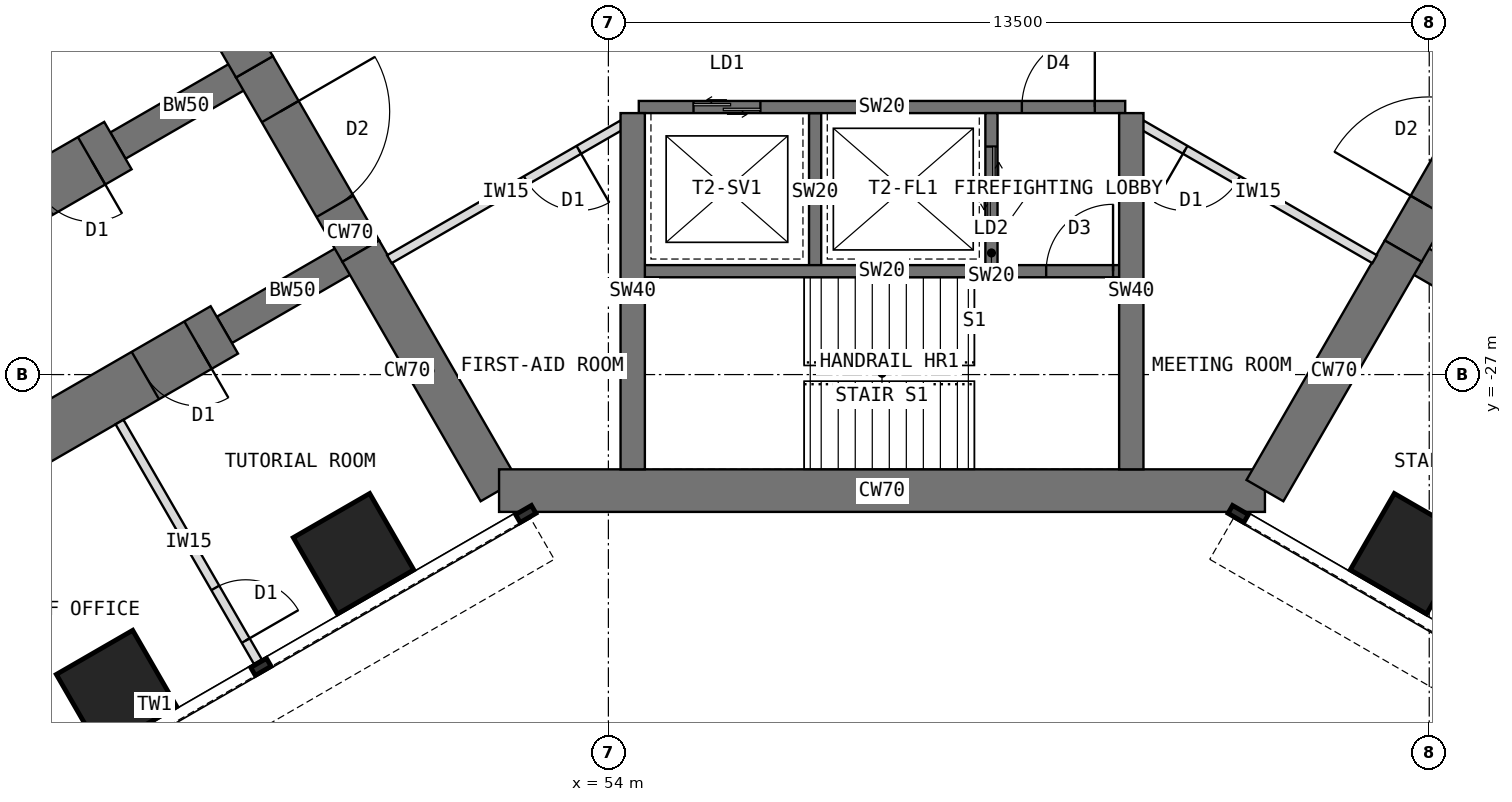
"""IFC4 building model, lengths in metres.
Left out: names, types, materials, properties, quantities, classifications, styles, units other than length and angle.
Written with IfcOpenShell. Run it as: python <this file> out.ifc"""

import sys

from ifc_helpers import new_model, si_unit, direction, frame, frame_2d, origin, origin_2d, place, context, subcontext, project, spatial, rectangle, extrude, element, fill, save


model = new_model("IFC4")
c1 = context("Model", 3, precision=1e-05, world=origin(), true_north=direction((0.0, 1.0)))
c2 = subcontext(c1, "Body", "Model", "MODEL_VIEW")
j1 = project(units=[si_unit("LENGTHUNIT", "METRE"), si_unit("PLANEANGLEUNIT", "RADIAN")], contexts=[c1])
p1 = place(None, origin())
s1 = spatial("IfcSite", under=j1, at=p1, CompositionType="ELEMENT")
p2 = place(p1, origin())
s2 = spatial("IfcBuilding", under=s1, at=p2, CompositionType="ELEMENT")
p3 = place(p2, frame((0.0, 0.0, 68.5)))
s3 = spatial("IfcBuildingStorey", under=s2, at=p3, CompositionType="ELEMENT", Elevation=68.5)
p4 = place(p3, frame((45.904, -18.0, 0.0), z_axis=(0.0, 0.0, 1.0), x_axis=(0.500024481964, -0.866011268655, 0.0)))
e1 = element("IfcWall", 1, at=p4, inside=s3, PredefinedType="SHEAR", context=c2, shape_type="SweptSolid", body=[
    extrude(rectangle(XDim=4.548, YDim=0.7, at=frame_2d((2.274, 0.0))), origin(), (0.0, 0.0, 1.0), 4.0),
])
p5 = place(p3, frame((48.178, -21.939, 0.0), z_axis=(0.0, 0.0, 1.0), x_axis=(0.500010275428, -0.866019471182, 0.0)))
e2 = element("IfcWall", 2, at=p5, inside=s3, PredefinedType="SHEAR", context=c2, shape_type="SweptSolid", body=[
    extrude(rectangle(XDim=3.5, YDim=0.7, at=frame_2d((1.75, 0.0))), origin(), (0.0, 0.0, 1.0), 4.0),
])
p6 = place(p5, frame((0.85, 0.0, 0.0)))
e3 = element("IfcOpeningElement", 3, at=p6, cuts=e2, PredefinedType="OPENING", context=c2, shape_type="SweptSolid", body=[
    extrude(rectangle(XDim=1.8, YDim=2.1, at=frame_2d((0.9, 1.05))), frame((0.0, 0.36, 0.0), z_axis=(0.0, -1.0, 0.0), x_axis=(1.0, 0.0, 0.0)), (0.0, 0.0, 1.0), 0.72),
])
p7 = place(p3, frame((49.928, -24.97, 0.0), z_axis=(0.0, 0.0, 1.0), x_axis=(0.499984222037, -0.866034513004, 0.0)))
e4 = element("IfcWall", 4, at=p7, inside=s3, PredefinedType="SHEAR", context=c2, shape_type="SweptSolid", body=[
    extrude(rectangle(XDim=4.548, YDim=0.7, at=frame_2d((2.274, 0.0))), origin(), (0.0, 0.0, 1.0), 4.0),
])
p8 = place(p3, frame((52.202, -28.908, 0.0), z_axis=(0.0, 0.0, 1.0), x_axis=(1.0, 0.0, 0.0)))
e5 = element("IfcWall", 5, at=p8, inside=s3, PredefinedType="SHEAR", context=c2, shape_type="SweptSolid", body=[
    extrude(rectangle(XDim=12.596, YDim=0.7, at=frame_2d((6.298, 0.0))), origin(), (0.0, 0.0, 1.0), 4.0),
])
p9 = place(p3, frame((64.798, -28.908, 0.0), z_axis=(0.0, 0.0, 1.0), x_axis=(0.499984222037, 0.866034513004, 0.0)))
e6 = element("IfcWall", 6, at=p9, inside=s3, PredefinedType="SHEAR", context=c2, shape_type="SweptSolid", body=[
    extrude(rectangle(XDim=4.548, YDim=0.7, at=frame_2d((2.274, 0.0))), origin(), (0.0, 0.0, 1.0), 4.0),
])
p10 = place(p3, frame((67.072, -24.97, 0.0), z_axis=(0.0, 0.0, 1.0), x_axis=(0.500010275428, 0.866019471182, 0.0)))
e7 = element("IfcWall", 7, at=p10, inside=s3, PredefinedType="SHEAR", context=c2, shape_type="SweptSolid", body=[
    extrude(rectangle(XDim=3.5, YDim=0.7, at=frame_2d((1.75, 0.0))), origin(), (0.0, 0.0, 1.0), 4.0),
])
p11 = place(p10, frame((0.85, 0.0, 0.0)))
e8 = element("IfcOpeningElement", 8, at=p11, cuts=e7, PredefinedType="OPENING", context=c2, shape_type="SweptSolid", body=[
    extrude(rectangle(XDim=1.8, YDim=2.1, at=frame_2d((0.9, 1.05))), frame((0.0, 0.36, 0.0), z_axis=(0.0, -1.0, 0.0), x_axis=(1.0, 0.0, 0.0)), (0.0, 0.0, 1.0), 0.72),
])
p12 = place(p3, frame((49.928, -24.97, 0.0), z_axis=(0.0, 0.0, 1.0), x_axis=(-0.866031863473, -0.499988811324, 0.0)))
e9 = element("IfcWall", 9, at=p12, inside=s3, PredefinedType="SHEAR", context=c2, shape_type="SweptSolid", body=[
    extrude(rectangle(XDim=2.592, YDim=0.5, at=frame_2d((1.296, 0.0))), origin(), (0.0, 0.0, 1.0), 4.0),
])
p13 = place(p3, frame((47.684, -26.266, 0.0), z_axis=(0.0, 0.0, 1.0), x_axis=(-0.866027579429, -0.499996231654, 0.0)))
e10 = element("IfcWall", 10, at=p13, inside=s3, PredefinedType="SHEAR", context=c2, shape_type="SweptSolid", body=[
    extrude(rectangle(XDim=13.2, YDim=0.9, at=frame_2d((6.6, 0.0))), origin(), (0.0, 0.0, 1.0), 4.0),
])
p14 = place(p13, frame((0.5, 0.0, 0.0)))
e11 = element("IfcOpeningElement", 11, at=p14, cuts=e10, PredefinedType="OPENING", context=c2, shape_type="SweptSolid", body=[
    extrude(rectangle(XDim=1.0, YDim=2.1, at=frame_2d((0.5, 1.05))), frame((0.0, 0.46, 0.0), z_axis=(0.0, -1.0, 0.0), x_axis=(1.0, 0.0, 0.0)), (0.0, 0.0, 1.0), 0.92),
])
p15 = place(p13, frame((7.25, 0.0, 0.0)))
e12 = element("IfcOpeningElement", 12, at=p15, cuts=e10, PredefinedType="OPENING", context=c2, shape_type="SweptSolid", body=[
    extrude(rectangle(XDim=1.0, YDim=2.1, at=frame_2d((0.5, 1.05))), frame((0.0, 0.46, 0.0), z_axis=(0.0, -1.0, 0.0), x_axis=(1.0, 0.0, 0.0)), (0.0, 0.0, 1.0), 0.92),
])
p16 = place(p3, frame((48.178, -21.939, 0.0), z_axis=(0.0, 0.0, 1.0), x_axis=(-0.866072649678, -0.499918158782, 0.0)))
e13 = element("IfcWall", 13, at=p16, inside=s3, PredefinedType="SHEAR", context=c2, shape_type="SweptSolid", body=[
    extrude(rectangle(XDim=2.592, YDim=0.5, at=frame_2d((1.296, 0.0))), origin(), (0.0, 0.0, 1.0), 4.0),
])
p17 = place(p3, frame((45.934, -23.234, 0.0), z_axis=(0.0, 0.0, 1.0), x_axis=(-0.866019570528, -0.500010103361, 0.0)))
e14 = element("IfcWall", 14, at=p17, inside=s3, PredefinedType="SHEAR", context=c2, shape_type="SweptSolid", body=[
    extrude(rectangle(XDim=13.2, YDim=0.9, at=frame_2d((6.6, 0.0))), origin(), (0.0, 0.0, 1.0), 4.0),
])
p18 = place(p17, frame((0.5, 0.0, 0.0)))
e15 = element("IfcOpeningElement", 15, at=p18, cuts=e14, PredefinedType="OPENING", context=c2, shape_type="SweptSolid", body=[
    extrude(rectangle(XDim=1.0, YDim=2.1, at=frame_2d((0.5, 1.05))), frame((0.0, 0.46, 0.0), z_axis=(0.0, -1.0, 0.0), x_axis=(1.0, 0.0, 0.0)), (0.0, 0.0, 1.0), 0.92),
])
p19 = place(p17, frame((7.25, 0.0, 0.0)))
e16 = element("IfcOpeningElement", 16, at=p19, cuts=e14, PredefinedType="OPENING", context=c2, shape_type="SweptSolid", body=[
    extrude(rectangle(XDim=1.0, YDim=2.1, at=frame_2d((0.5, 1.05))), frame((0.0, 0.46, 0.0), z_axis=(0.0, -1.0, 0.0), x_axis=(1.0, 0.0, 0.0)), (0.0, 0.0, 1.0), 0.92),
])
p20 = place(p3, frame((67.072, -24.97, 0.0), z_axis=(0.0, 0.0, 1.0), x_axis=(0.866031863473, -0.499988811324, 0.0)))
e17 = element("IfcWall", 17, at=p20, inside=s3, PredefinedType="SHEAR", context=c2, shape_type="SweptSolid", body=[
    extrude(rectangle(XDim=2.592, YDim=0.5, at=frame_2d((1.296, 0.0))), origin(), (0.0, 0.0, 1.0), 4.0),
])
for number, where, z_axis, x_axis in (
    (18, (49.809, -29.946, 0.0), (0.0, 0.0, 1.0), (0.866, 0.5, 0.0)),
    (19, (45.912, -32.196, 0.0), (0.0, 0.0, 1.0), (0.866, 0.5, 0.0)),
    (20, (67.191, -29.946, 0.0), (0.0, 0.0, 1.0), (0.5, 0.866, 0.0)),
):
    element("IfcColumn", number, at=place(p3, frame(where, z_axis=z_axis, x_axis=x_axis)), inside=s3, PredefinedType="COLUMN", context=c2, shape_type="SweptSolid", body=[
        extrude(rectangle(XDim=1.45, YDim=1.45, at=origin_2d()), origin(), (0.0, 0.0, 1.0), 4.0),
    ])
p21 = place(p3, frame((54.5, -22.6, 0.0), z_axis=(0.0, 0.0, 1.0), x_axis=(1.0, 0.0, 0.0)))
e21 = element("IfcWall", 21, at=p21, inside=s3, PredefinedType="SHEAR", context=c2, shape_type="SweptSolid", body=[
    extrude(rectangle(XDim=8.0, YDim=0.2, at=frame_2d((4.0, 0.0))), origin(), (0.0, 0.0, 1.0), 4.0),
])
p22 = place(p21, frame((6.3, 0.0, 0.0)))
e22 = element("IfcOpeningElement", 22, at=p22, cuts=e21, PredefinedType="OPENING", context=c2, shape_type="SweptSolid", body=[
    extrude(rectangle(XDim=1.2, YDim=2.1, at=frame_2d((0.6, 1.05))), frame((0.0, 0.11, 0.0), z_axis=(0.0, -1.0, 0.0), x_axis=(1.0, 0.0, 0.0)), (0.0, 0.0, 1.0), 0.22),
])
p23 = place(p21, frame((0.9, 0.0, 0.0)))
e23 = element("IfcOpeningElement", 23, at=p23, cuts=e21, PredefinedType="OPENING", context=c2, shape_type="SweptSolid", body=[
    extrude(rectangle(XDim=1.1, YDim=2.2, at=frame_2d((0.55, 1.1))), frame((0.0, 0.11, 0.0), z_axis=(0.0, -1.0, 0.0), x_axis=(1.0, 0.0, 0.0)), (0.0, 0.0, 1.0), 0.22),
])
p24 = place(p3, frame((57.4, -22.7, 0.0), z_axis=(0.0, 0.0, 1.0), x_axis=(0.0, -1.0, 0.0)))
e24 = element("IfcWall", 24, at=p24, inside=s3, PredefinedType="SHEAR", context=c2, shape_type="SweptSolid", body=[
    extrude(rectangle(XDim=2.6, YDim=0.2, at=frame_2d((1.3, 0.0))), origin(), (0.0, 0.0, 1.0), 4.0),
])
p25 = place(p3, frame((60.3, -22.7, 0.0), z_axis=(0.0, 0.0, 1.0), x_axis=(0.0, -1.0, 0.0)))
e25 = element("IfcWall", 25, at=p25, inside=s3, PredefinedType="SHEAR", context=c2, shape_type="SweptSolid", body=[
    extrude(rectangle(XDim=2.6, YDim=0.2, at=frame_2d((1.3, 0.0))), origin(), (0.0, 0.0, 1.0), 4.0),
])
p26 = place(p25, frame((0.55, 0.0, 0.0)))
e26 = element("IfcOpeningElement", 26, at=p26, cuts=e25, PredefinedType="OPENING", context=c2, shape_type="SweptSolid", body=[
    extrude(rectangle(XDim=1.3, YDim=2.2, at=frame_2d((0.65, 1.1))), frame((0.0, 0.11, 0.0), z_axis=(0.0, -1.0, 0.0), x_axis=(1.0, 0.0, 0.0)), (0.0, 0.0, 1.0), 0.22),
])
p27 = place(p3, frame((54.5, -25.3, 0.0), z_axis=(0.0, 0.0, 1.0), x_axis=(1.0, 0.0, 0.0)))
e27 = element("IfcWall", 27, at=p27, inside=s3, PredefinedType="SHEAR", context=c2, shape_type="SweptSolid", body=[
    extrude(rectangle(XDim=8.0, YDim=0.2, at=frame_2d((4.0, 0.0))), origin(), (0.0, 0.0, 1.0), 4.0),
])
p28 = place(p27, frame((6.7, 0.0, 0.0)))
e28 = element("IfcOpeningElement", 28, at=p28, cuts=e27, PredefinedType="OPENING", context=c2, shape_type="SweptSolid", body=[
    extrude(rectangle(XDim=1.1, YDim=2.1, at=frame_2d((0.55, 1.05))), frame((0.0, 0.11, 0.0), z_axis=(0.0, -1.0, 0.0), x_axis=(1.0, 0.0, 0.0)), (0.0, 0.0, 1.0), 0.22),
])
for number, where, z_axis, x_axis in (
    (29, (62.6, -22.7, 0.0), (0.0, 0.0, 1.0), (0.0, -1.0, 0.0)),
    (30, (54.4, -22.7, 0.0), (0.0, 0.0, 1.0), (0.0, -1.0, 0.0)),
):
    element("IfcWall", number, at=place(p3, frame(where, z_axis=z_axis, x_axis=x_axis)), inside=s3, PredefinedType="SHEAR", context=c2, shape_type="SweptSolid", body=[
        extrude(rectangle(XDim=5.858, YDim=0.4, at=frame_2d((2.929, 0.0))), origin(), (0.0, 0.0, 1.0), 4.0),
    ])
p29 = place(p3, frame((45.96, -27.78, 0.0), z_axis=(0.0, 0.0, 1.0), x_axis=(0.499982560684, -0.866035472144, 0.0)))
e31 = element("IfcWall", 31, at=p29, inside=s3, PredefinedType="PARTITIONING", context=c2, shape_type="SweptSolid", body=[
    extrude(rectangle(XDim=4.55, YDim=0.15, at=frame_2d((2.275, 0.0))), origin(), (0.0, 0.0, 1.0), 3.8),
])
p30 = place(p29, frame((3.15, 0.0, 0.0)))
e32 = element("IfcOpeningElement", 32, at=p30, cuts=e31, PredefinedType="OPENING", context=c2, shape_type="SweptSolid", body=[
    extrude(rectangle(XDim=1.0, YDim=2.1, at=frame_2d((0.5, 1.05))), frame((0.0, 0.085, 0.0), z_axis=(0.0, -1.0, 0.0), x_axis=(1.0, 0.0, 0.0)), (0.0, 0.0, 1.0), 0.17),
])
p31 = place(p3, frame((66.603, -25.103, 0.0), z_axis=(0.0, 0.0, 1.0), x_axis=(-0.866021148949, 0.500007369519, 0.0)))
e33 = element("IfcWall", 33, at=p31, inside=s3, PredefinedType="PARTITIONING", context=c2, shape_type="SweptSolid", body=[
    extrude(rectangle(XDim=4.426, YDim=0.15, at=frame_2d((2.213, 0.0))), origin(), (0.0, 0.0, 1.0), 3.8),
])
p32 = place(p31, frame((2.598, 0.0, 0.0)))
e34 = element("IfcOpeningElement", 34, at=p32, cuts=e33, PredefinedType="OPENING", context=c2, shape_type="SweptSolid", body=[
    extrude(rectangle(XDim=1.0, YDim=2.1, at=frame_2d((0.5, 1.05))), frame((0.0, 0.085, 0.0), z_axis=(0.0, -1.0, 0.0), x_axis=(1.0, 0.0, 0.0)), (0.0, 0.0, 1.0), 0.17),
])
p33 = place(p3, frame((54.23, -22.89, 0.0), z_axis=(0.0, 0.0, 1.0), x_axis=(-0.866021148949, -0.500007369519, 0.0)))
e35 = element("IfcWall", 35, at=p33, inside=s3, PredefinedType="PARTITIONING", context=c2, shape_type="SweptSolid", body=[
    extrude(rectangle(XDim=4.426, YDim=0.15, at=frame_2d((2.213, 0.0))), origin(), (0.0, 0.0, 1.0), 3.8),
])
p34 = place(p33, frame((0.828, 0.0, 0.0)))
e36 = element("IfcOpeningElement", 36, at=p34, cuts=e35, PredefinedType="OPENING", context=c2, shape_type="SweptSolid", body=[
    extrude(rectangle(XDim=1.0, YDim=2.1, at=frame_2d((0.5, 1.05))), frame((0.0, 0.085, 0.0), z_axis=(0.0, -1.0, 0.0), x_axis=(1.0, 0.0, 0.0)), (0.0, 0.0, 1.0), 0.17),
])
p35 = place(p22, origin())
e37 = element("IfcDoor", 37, at=p35, inside=s3, OperationType="SINGLE_SWING_RIGHT", PredefinedType="DOOR", context=c2, shape_type="SweptSolid", body=[
    extrude(rectangle(XDim=1.2, YDim=2.1, at=frame_2d((0.6, 1.05))), frame((0.0, 0.025, 0.0), z_axis=(0.0, -1.0, 0.0), x_axis=(1.0, 0.0, 0.0)), (0.0, 0.0, 1.0), 0.05),
])
fill(e22, e37)
p36 = place(p26, origin())
e38 = element("IfcDoor", 38, at=p36, inside=s3, OperationType="DOUBLE_DOOR_SLIDING", PredefinedType="DOOR", context=c2, shape_type="SweptSolid", body=[
    extrude(rectangle(XDim=1.3, YDim=2.2, at=frame_2d((0.65, 1.1))), frame((0.0, 0.025, 0.0), z_axis=(0.0, -1.0, 0.0), x_axis=(1.0, 0.0, 0.0)), (0.0, 0.0, 1.0), 0.05),
])
fill(e26, e38)
p37 = place(p23, origin())
e39 = element("IfcDoor", 39, at=p37, inside=s3, OperationType="DOUBLE_DOOR_SLIDING", PredefinedType="DOOR", context=c2, shape_type="SweptSolid", body=[
    extrude(rectangle(XDim=1.1, YDim=2.2, at=frame_2d((0.55, 1.1))), frame((0.0, 0.025, 0.0), z_axis=(0.0, -1.0, 0.0), x_axis=(1.0, 0.0, 0.0)), (0.0, 0.0, 1.0), 0.05),
])
fill(e23, e39)
p38 = place(p28, origin())
e40 = element("IfcDoor", 40, at=p38, inside=s3, OperationType="SINGLE_SWING_RIGHT", PredefinedType="DOOR", context=c2, shape_type="SweptSolid", body=[
    extrude(rectangle(XDim=1.1, YDim=2.1, at=frame_2d((0.55, 1.05))), frame((0.0, 0.025, 0.0), z_axis=(0.0, -1.0, 0.0), x_axis=(1.0, 0.0, 0.0)), (0.0, 0.0, 1.0), 0.05),
])
fill(e28, e40)
p39 = place(p6, origin())
e41 = element("IfcDoor", 41, at=p39, inside=s3, OperationType="DOUBLE_DOOR_DOUBLE_SWING", PredefinedType="DOOR", context=c2, shape_type="SweptSolid", body=[
    extrude(rectangle(XDim=1.72, YDim=2.06, at=frame_2d((0.9, 1.03))), frame((0.0, 0.025, 0.0), z_axis=(0.0, -1.0, 0.0), x_axis=(1.0, 0.0, 0.0)), (0.0, 0.0, 1.0), 0.05),
    extrude(rectangle(XDim=0.04, YDim=2.1, at=frame_2d((0.02, 1.05))), frame((0.0, 0.35, 0.0), z_axis=(0.0, -1.0, 0.0), x_axis=(1.0, 0.0, 0.0)), (0.0, 0.0, 1.0), 0.699),
    extrude(rectangle(XDim=0.04, YDim=2.1, at=frame_2d((1.78, 1.05))), frame((0.0, 0.35, 0.0), z_axis=(0.0, -1.0, 0.0), x_axis=(1.0, 0.0, 0.0)), (0.0, 0.0, 1.0), 0.699),
    extrude(rectangle(XDim=1.72, YDim=0.04, at=frame_2d((0.9, 2.08))), frame((0.0, 0.35, 0.0), z_axis=(0.0, -1.0, 0.0), x_axis=(1.0, 0.0, 0.0)), (0.0, 0.0, 1.0), 0.699),
])
fill(e3, e41)
p40 = place(p11, origin())
e42 = element("IfcDoor", 42, at=p40, inside=s3, OperationType="DOUBLE_DOOR_DOUBLE_SWING", PredefinedType="DOOR", context=c2, shape_type="SweptSolid", body=[
    extrude(rectangle(XDim=1.72, YDim=2.06, at=frame_2d((0.9, 1.03))), frame((0.0, 0.025, 0.0), z_axis=(0.0, -1.0, 0.0), x_axis=(1.0, 0.0, 0.0)), (0.0, 0.0, 1.0), 0.05),
    extrude(rectangle(XDim=0.04, YDim=2.1, at=frame_2d((0.02, 1.05))), frame((0.0, 0.35, 0.0), z_axis=(0.0, -1.0, 0.0), x_axis=(1.0, 0.0, 0.0)), (0.0, 0.0, 1.0), 0.699),
    extrude(rectangle(XDim=0.04, YDim=2.1, at=frame_2d((1.78, 1.05))), frame((0.0, 0.35, 0.0), z_axis=(0.0, -1.0, 0.0), x_axis=(1.0, 0.0, 0.0)), (0.0, 0.0, 1.0), 0.699),
    extrude(rectangle(XDim=1.72, YDim=0.04, at=frame_2d((0.9, 2.08))), frame((0.0, 0.35, 0.0), z_axis=(0.0, -1.0, 0.0), x_axis=(1.0, 0.0, 0.0)), (0.0, 0.0, 1.0), 0.699),
])
fill(e8, e42)
p41 = place(p30, origin())
e43 = element("IfcDoor", 43, at=p41, inside=s3, OperationType="SINGLE_SWING_RIGHT", PredefinedType="DOOR", context=c2, shape_type="SweptSolid", body=[
    extrude(rectangle(XDim=1.0, YDim=2.1, at=frame_2d((0.5, 1.05))), frame((0.0, 0.025, 0.0), z_axis=(0.0, -1.0, 0.0), x_axis=(1.0, 0.0, 0.0)), (0.0, 0.0, 1.0), 0.05),
])
fill(e32, e43)
p42 = place(p34, origin())
e44 = element("IfcDoor", 44, at=p42, inside=s3, OperationType="SINGLE_SWING_LEFT", PredefinedType="DOOR", context=c2, shape_type="SweptSolid", body=[
    extrude(rectangle(XDim=1.0, YDim=2.1, at=frame_2d((0.5, 1.05))), frame((0.0, 0.025, 0.0), z_axis=(0.0, -1.0, 0.0), x_axis=(1.0, 0.0, 0.0)), (0.0, 0.0, 1.0), 0.05),
])
fill(e36, e44)
p43 = place(p32, origin())
e45 = element("IfcDoor", 45, at=p43, inside=s3, OperationType="SINGLE_SWING_RIGHT", PredefinedType="DOOR", context=c2, shape_type="SweptSolid", body=[
    extrude(rectangle(XDim=1.0, YDim=2.1, at=frame_2d((0.5, 1.05))), frame((0.0, 0.025, 0.0), z_axis=(0.0, -1.0, 0.0), x_axis=(1.0, 0.0, 0.0)), (0.0, 0.0, 1.0), 0.05),
])
fill(e34, e45)
p44 = place(p14, origin())
e46 = element("IfcDoor", 46, at=p44, inside=s3, OperationType="SINGLE_SWING_LEFT", PredefinedType="DOOR", context=c2, shape_type="SweptSolid", body=[
    extrude(rectangle(XDim=0.92, YDim=2.06, at=frame_2d((0.5, 1.03))), frame((0.0, 0.025, 0.0), z_axis=(0.0, -1.0, 0.0), x_axis=(1.0, 0.0, 0.0)), (0.0, 0.0, 1.0), 0.05),
    extrude(rectangle(XDim=0.04, YDim=2.1, at=frame_2d((0.02, 1.05))), frame((0.0, 0.45, 0.0), z_axis=(0.0, -1.0, 0.0), x_axis=(1.0, 0.0, 0.0)), (0.0, 0.0, 1.0), 0.899),
    extrude(rectangle(XDim=0.04, YDim=2.1, at=frame_2d((0.98, 1.05))), frame((0.0, 0.45, 0.0), z_axis=(0.0, -1.0, 0.0), x_axis=(1.0, 0.0, 0.0)), (0.0, 0.0, 1.0), 0.899),
    extrude(rectangle(XDim=0.92, YDim=0.04, at=frame_2d((0.5, 2.08))), frame((0.0, 0.45, 0.0), z_axis=(0.0, -1.0, 0.0), x_axis=(1.0, 0.0, 0.0)), (0.0, 0.0, 1.0), 0.899),
])
fill(e11, e46)
p45 = place(p18, origin())
e47 = element("IfcDoor", 47, at=p45, inside=s3, OperationType="SINGLE_SWING_LEFT", PredefinedType="DOOR", context=c2, shape_type="SweptSolid", body=[
    extrude(rectangle(XDim=0.92, YDim=2.06, at=frame_2d((0.5, 1.03))), frame((0.0, 0.025, 0.0), z_axis=(0.0, -1.0, 0.0), x_axis=(1.0, 0.0, 0.0)), (0.0, 0.0, 1.0), 0.05),
    extrude(rectangle(XDim=0.04, YDim=2.1, at=frame_2d((0.02, 1.05))), frame((0.0, 0.45, 0.0), z_axis=(0.0, -1.0, 0.0), x_axis=(1.0, 0.0, 0.0)), (0.0, 0.0, 1.0), 0.899),
    extrude(rectangle(XDim=0.04, YDim=2.1, at=frame_2d((0.98, 1.05))), frame((0.0, 0.45, 0.0), z_axis=(0.0, -1.0, 0.0), x_axis=(1.0, 0.0, 0.0)), (0.0, 0.0, 1.0), 0.899),
    extrude(rectangle(XDim=0.92, YDim=0.04, at=frame_2d((0.5, 2.08))), frame((0.0, 0.45, 0.0), z_axis=(0.0, -1.0, 0.0), x_axis=(1.0, 0.0, 0.0)), (0.0, 0.0, 1.0), 0.899),
])
fill(e15, e47)
save(model, sys.argv[1])
